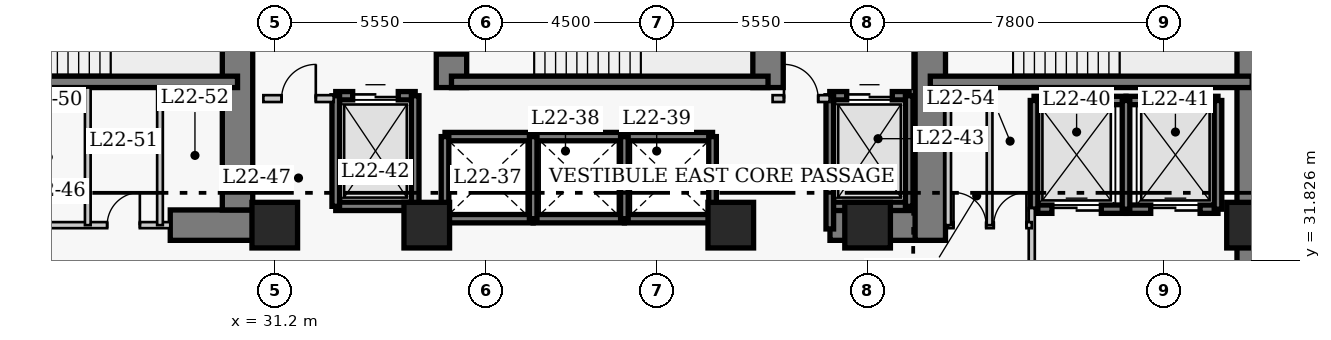
"""IFC4 building model, lengths in metres.
Left out: names, types, materials, properties, quantities, classifications, styles, units other than length and angle.
Written with IfcOpenShell. Run it as: python <this file> out.ifc"""

import sys

from ifc_helpers import new_model, si_unit, direction, frame, frame_2d, origin, origin_2d, place, context, subcontext, project, spatial, rectangle, extrude, element, fill, save


model = new_model("IFC4")
c1 = context("Model", 3, precision=1e-05, world=origin(), true_north=direction((0.0, 1.0)))
c2 = subcontext(c1, "Body", "Model", "MODEL_VIEW")
j1 = project(units=[si_unit("LENGTHUNIT", "METRE"), si_unit("PLANEANGLEUNIT", "RADIAN")], contexts=[c1])
p1 = place(None, origin())
s1 = spatial("IfcSite", under=j1, at=p1, CompositionType="ELEMENT")
p2 = place(p1, origin())
s2 = spatial("IfcBuilding", under=s1, at=p2, CompositionType="ELEMENT")
p3 = place(p2, frame((0.0, 0.0, 91.8)))
s3 = spatial("IfcBuildingStorey", under=s2, at=p3, CompositionType="ELEMENT", Elevation=91.8)
p4 = place(p3, frame((56.92, 27.05, 0.0), z_axis=(0.0, 0.0, 1.0), x_axis=(0.0, 1.0, 0.0)))
e1 = element("IfcWall", 1, at=p4, inside=s3, PredefinedType="SHEAR", context=c2, shape_type="SweptSolid", body=[
    extrude(rectangle(XDim=13.67, YDim=0.8, at=frame_2d((6.835, 0.0))), origin(), (0.0, 0.0, 1.0), 3.8),
])
p5 = place(p3, frame((28.45, 32.75, 0.0), z_axis=(0.0, 0.0, 1.0), x_axis=(1.0, 0.0, 0.0)))
e2 = element("IfcWall", 2, at=p5, inside=s3, PredefinedType="SHEAR", context=c2, shape_type="SweptSolid", body=[
    extrude(rectangle(XDim=2.4, YDim=0.8, at=frame_2d((1.2, 0.0))), origin(), (0.0, 0.0, 1.0), 3.8),
])
p6 = place(p3, frame((45.81, 32.75, 0.0), z_axis=(0.0, 0.0, 1.0), x_axis=(1.0, 0.0, 0.0)))
e3 = element("IfcWall", 3, at=p6, inside=s3, PredefinedType="SHEAR", context=c2, shape_type="SweptSolid", body=[
    extrude(rectangle(XDim=2.64, YDim=0.8, at=frame_2d((1.32, 0.0))), origin(), (0.0, 0.0, 1.0), 3.8),
])
p7 = place(p3, frame((30.22, 33.15, 0.0), z_axis=(0.0, 0.0, 1.0), x_axis=(0.0, 1.0, 0.0)))
e4 = element("IfcWall", 4, at=p7, inside=s3, PredefinedType="SHEAR", context=c2, shape_type="SweptSolid", body=[
    extrude(rectangle(XDim=7.17, YDim=0.8, at=frame_2d((3.585, 0.0))), origin(), (0.0, 0.0, 1.0), 3.8),
])
p8 = place(p3, frame((35.85, 36.37, 0.0), z_axis=(0.0, 0.0, 1.0), x_axis=(0.0, 1.0, 0.0)))
e5 = element("IfcWall", 5, at=p8, inside=s3, PredefinedType="SHEAR", context=c2, shape_type="SweptSolid", body=[
    extrude(rectangle(XDim=3.95, YDim=0.8, at=frame_2d((1.975, 0.0))), origin(), (0.0, 0.0, 1.0), 3.8),
])
p9 = place(p8, frame((0.88, 0.0, 0.0)))
e6 = element("IfcOpeningElement", 6, at=p9, cuts=e5, PredefinedType="OPENING", context=c2, shape_type="SweptSolid", body=[
    extrude(rectangle(XDim=1.1, YDim=2.15, at=frame_2d((0.55, 1.075))), frame((0.0, 0.41, 0.0), z_axis=(0.0, -1.0, 0.0), x_axis=(1.0, 0.0, 0.0)), (0.0, 0.0, 1.0), 0.82),
])
p10 = place(p3, frame((44.18, 36.37, 0.0), z_axis=(0.0, 0.0, 1.0), x_axis=(0.0, 1.0, 0.0)))
e7 = element("IfcWall", 7, at=p10, inside=s3, PredefinedType="SHEAR", context=c2, shape_type="SweptSolid", body=[
    extrude(rectangle(XDim=3.95, YDim=0.8, at=frame_2d((1.975, 0.0))), origin(), (0.0, 0.0, 1.0), 3.8),
])
p11 = place(p3, frame((48.45, 32.35, 0.0), z_axis=(0.0, 0.0, 1.0), x_axis=(0.0, 1.0, 0.0)))
e8 = element("IfcWall", 8, at=p11, inside=s3, PredefinedType="SHEAR", context=c2, shape_type="SweptSolid", body=[
    extrude(rectangle(XDim=7.97, YDim=0.8, at=frame_2d((3.985, 0.0))), origin(), (0.0, 0.0, 1.0), 3.8),
])
p12 = place(p11, frame((5.85, 0.0, 0.0)))
e9 = element("IfcOpeningElement", 9, at=p12, cuts=e8, PredefinedType="OPENING", context=c2, shape_type="SweptSolid", body=[
    extrude(rectangle(XDim=1.1, YDim=2.15, at=frame_2d((0.55, 1.075))), frame((0.0, 0.41, 0.0), z_axis=(0.0, -1.0, 0.0), x_axis=(1.0, 0.0, 0.0)), (0.0, 0.0, 1.0), 0.82),
])
p13 = place(p3, frame((21.9, 36.52, 0.0), z_axis=(0.0, 0.0, 1.0), x_axis=(1.0, 0.0, 0.0)))
e10 = element("IfcWall", 10, at=p13, inside=s3, PredefinedType="SHEAR", context=c2, shape_type="SweptSolid", body=[
    extrude(rectangle(XDim=8.32, YDim=0.3, at=frame_2d((4.16, 0.0))), origin(), (0.0, 0.0, 1.0), 3.8),
])
p14 = place(p13, frame((0.9, 0.0, 0.0)))
e11 = element("IfcOpeningElement", 11, at=p14, cuts=e10, PredefinedType="OPENING", context=c2, shape_type="SweptSolid", body=[
    extrude(rectangle(XDim=1.1, YDim=2.15, at=frame_2d((0.55, 1.075))), frame((0.0, 0.16, 0.0), z_axis=(0.0, -1.0, 0.0), x_axis=(1.0, 0.0, 0.0)), (0.0, 0.0, 1.0), 0.32),
])
p15 = place(p3, frame((35.85, 36.52, 0.0), z_axis=(0.0, 0.0, 1.0), x_axis=(1.0, 0.0, 0.0)))
e12 = element("IfcWall", 12, at=p15, inside=s3, PredefinedType="SHEAR", context=c2, shape_type="SweptSolid", body=[
    extrude(rectangle(XDim=8.33, YDim=0.3, at=frame_2d((4.165, 0.0))), origin(), (0.0, 0.0, 1.0), 3.8),
])
p16 = place(p3, frame((48.45, 36.52, 0.0), z_axis=(0.0, 0.0, 1.0), x_axis=(1.0, 0.0, 0.0)))
e13 = element("IfcWall", 13, at=p16, inside=s3, PredefinedType="SHEAR", context=c2, shape_type="SweptSolid", body=[
    extrude(rectangle(XDim=8.47, YDim=0.3, at=frame_2d((4.235, 0.0))), origin(), (0.0, 0.0, 1.0), 3.8),
])
for number, where, z_axis, x_axis in (
    (14, (31.2, 32.75, 0.0), (0.0, 0.0, 1.0), (1.0, 0.0, 0.0)),
    (15, (35.2, 32.75, 0.0), (0.0, 0.0, 1.0), (1.0, 0.0, 0.0)),
    (16, (43.2, 32.75, 0.0), (0.0, 0.0, 1.0), (1.0, 0.0, 0.0)),
    (17, (46.8, 32.75, 0.0), (0.0, 0.0, 1.0), (1.0, 0.0, 0.0)),
    (18, (56.85, 32.75, 0.0), (0.0, 0.0, 1.0), (1.0, 0.0, 0.0)),
):
    element("IfcColumn", number, at=place(p3, frame(where, z_axis=z_axis, x_axis=x_axis)), inside=s3, PredefinedType="COLUMN", context=c2, shape_type="SweptSolid", body=[
        extrude(rectangle(XDim=1.2, YDim=1.2, at=origin_2d()), origin(), (0.0, 0.0, 1.0), 3.8),
    ])
for number, where, z_axis, x_axis in (
    (19, (35.68, 35.08, 0.0), (0.0, 0.0, 1.0), (1.0, 0.0, 0.0)),
    (20, (35.68, 32.92, 0.0), (0.0, 0.0, 1.0), (1.0, 0.0, 0.0)),
):
    element("IfcWall", number, at=place(p3, frame(where, z_axis=z_axis, x_axis=x_axis)), inside=s3, PredefinedType="SHEAR", context=c2, shape_type="SweptSolid", body=[
        extrude(rectangle(XDim=2.32, YDim=0.22, at=frame_2d((1.16, 0.0))), origin(), (0.0, 0.0, 1.0), 3.8),
    ])
p17 = place(p3, frame((35.68, 32.92, 0.0), z_axis=(0.0, 0.0, 1.0), x_axis=(0.0, 1.0, 0.0)))
e21 = element("IfcWall", 21, at=p17, inside=s3, PredefinedType="SHEAR", context=c2, shape_type="SweptSolid", body=[
    extrude(rectangle(XDim=2.16, YDim=0.2, at=frame_2d((1.08, 0.0))), origin(), (0.0, 0.0, 1.0), 3.8),
])
for number, where, z_axis, x_axis in (
    (22, (38.0, 35.08, 0.0), (0.0, 0.0, 1.0), (1.0, 0.0, 0.0)),
    (23, (38.0, 32.92, 0.0), (0.0, 0.0, 1.0), (1.0, 0.0, 0.0)),
):
    element("IfcWall", number, at=place(p3, frame(where, z_axis=z_axis, x_axis=x_axis)), inside=s3, PredefinedType="SHEAR", context=c2, shape_type="SweptSolid", body=[
        extrude(rectangle(XDim=2.4, YDim=0.22, at=frame_2d((1.2, 0.0))), origin(), (0.0, 0.0, 1.0), 3.8),
    ])
p18 = place(p3, frame((38.0, 32.92, 0.0), z_axis=(0.0, 0.0, 1.0), x_axis=(0.0, 1.0, 0.0)))
e24 = element("IfcWall", 24, at=p18, inside=s3, PredefinedType="SHEAR", context=c2, shape_type="SweptSolid", body=[
    extrude(rectangle(XDim=2.16, YDim=0.2, at=frame_2d((1.08, 0.0))), origin(), (0.0, 0.0, 1.0), 3.8),
])
for number, where, z_axis, x_axis in (
    (25, (40.4, 35.08, 0.0), (0.0, 0.0, 1.0), (1.0, 0.0, 0.0)),
    (26, (40.4, 32.92, 0.0), (0.0, 0.0, 1.0), (1.0, 0.0, 0.0)),
):
    element("IfcWall", number, at=place(p3, frame(where, z_axis=z_axis, x_axis=x_axis)), inside=s3, PredefinedType="SHEAR", context=c2, shape_type="SweptSolid", body=[
        extrude(rectangle(XDim=2.32, YDim=0.22, at=frame_2d((1.16, 0.0))), origin(), (0.0, 0.0, 1.0), 3.8),
    ])
for number, where, z_axis, x_axis in (
    (27, (40.4, 32.92, 0.0), (0.0, 0.0, 1.0), (0.0, 1.0, 0.0)),
    (28, (42.72, 32.92, 0.0), (0.0, 0.0, 1.0), (0.0, 1.0, 0.0)),
):
    element("IfcWall", number, at=place(p3, frame(where, z_axis=z_axis, x_axis=x_axis)), inside=s3, PredefinedType="SHEAR", context=c2, shape_type="SweptSolid", body=[
        extrude(rectangle(XDim=2.16, YDim=0.2, at=frame_2d((1.08, 0.0))), origin(), (0.0, 0.0, 1.0), 3.8),
    ])
p19 = place(p3, frame((51.18, 36.03, 0.0), z_axis=(0.0, 0.0, 1.0), x_axis=(1.0, 0.0, 0.0)))
e29 = element("IfcWall", 29, at=p19, inside=s3, PredefinedType="SHEAR", context=c2, shape_type="SweptSolid", body=[
    extrude(rectangle(XDim=2.42, YDim=0.22, at=frame_2d((1.21, 0.0))), origin(), (0.0, 0.0, 1.0), 3.8),
])
p20 = place(p3, frame((51.18, 33.17, 0.0), z_axis=(0.0, 0.0, 1.0), x_axis=(1.0, 0.0, 0.0)))
e30 = element("IfcWall", 30, at=p20, inside=s3, PredefinedType="SHEAR", context=c2, shape_type="SweptSolid", body=[
    extrude(rectangle(XDim=2.42, YDim=0.22, at=frame_2d((1.21, 0.0))), origin(), (0.0, 0.0, 1.0), 3.8),
])
p21 = place(p20, frame((0.47, 0.0, 0.0)))
e31 = element("IfcOpeningElement", 31, at=p21, cuts=e30, PredefinedType="OPENING", context=c2, shape_type="SweptSolid", body=[
    extrude(rectangle(XDim=1.3, YDim=2.15, at=frame_2d((0.65, 1.075))), frame((0.0, 0.12, 0.0), z_axis=(0.0, -1.0, 0.0), x_axis=(1.0, 0.0, 0.0)), (0.0, 0.0, 1.0), 0.24),
])
p22 = place(p3, frame((51.18, 33.17, 0.0), z_axis=(0.0, 0.0, 1.0), x_axis=(0.0, 1.0, 0.0)))
e32 = element("IfcWall", 32, at=p22, inside=s3, PredefinedType="SHEAR", context=c2, shape_type="SweptSolid", body=[
    extrude(rectangle(XDim=2.86, YDim=0.2, at=frame_2d((1.43, 0.0))), origin(), (0.0, 0.0, 1.0), 3.8),
])
p23 = place(p3, frame((53.6, 36.03, 0.0), z_axis=(0.0, 0.0, 1.0), x_axis=(1.0, 0.0, 0.0)))
e33 = element("IfcWall", 33, at=p23, inside=s3, PredefinedType="SHEAR", context=c2, shape_type="SweptSolid", body=[
    extrude(rectangle(XDim=2.42, YDim=0.22, at=frame_2d((1.21, 0.0))), origin(), (0.0, 0.0, 1.0), 3.8),
])
p24 = place(p3, frame((53.6, 33.17, 0.0), z_axis=(0.0, 0.0, 1.0), x_axis=(1.0, 0.0, 0.0)))
e34 = element("IfcWall", 34, at=p24, inside=s3, PredefinedType="SHEAR", context=c2, shape_type="SweptSolid", body=[
    extrude(rectangle(XDim=2.42, YDim=0.22, at=frame_2d((1.21, 0.0))), origin(), (0.0, 0.0, 1.0), 3.8),
])
p25 = place(p24, frame((0.65, 0.0, 0.0)))
e35 = element("IfcOpeningElement", 35, at=p25, cuts=e34, PredefinedType="OPENING", context=c2, shape_type="SweptSolid", body=[
    extrude(rectangle(XDim=1.3, YDim=2.15, at=frame_2d((0.65, 1.075))), frame((0.0, 0.12, 0.0), z_axis=(0.0, -1.0, 0.0), x_axis=(1.0, 0.0, 0.0)), (0.0, 0.0, 1.0), 0.24),
])
for number, where, z_axis, x_axis in (
    (36, (53.6, 33.17, 0.0), (0.0, 0.0, 1.0), (0.0, 1.0, 0.0)),
    (37, (56.02, 33.17, 0.0), (0.0, 0.0, 1.0), (0.0, 1.0, 0.0)),
):
    element("IfcWall", number, at=place(p3, frame(where, z_axis=z_axis, x_axis=x_axis)), inside=s3, PredefinedType="SHEAR", context=c2, shape_type="SweptSolid", body=[
        extrude(rectangle(XDim=2.86, YDim=0.2, at=frame_2d((1.43, 0.0))), origin(), (0.0, 0.0, 1.0), 3.8),
    ])
p26 = place(p3, frame((32.805, 36.155, 0.0), z_axis=(0.0, 0.0, 1.0), x_axis=(1.0, 0.0, 0.0)))
e38 = element("IfcWall", 38, at=p26, inside=s3, PredefinedType="SHEAR", context=c2, shape_type="SweptSolid", body=[
    extrude(rectangle(XDim=2.09, YDim=0.22, at=frame_2d((1.045, 0.0))), origin(), (0.0, 0.0, 1.0), 3.8),
])
p27 = place(p26, frame((0.445, 0.0, 0.0)))
e39 = element("IfcOpeningElement", 39, at=p27, cuts=e38, PredefinedType="OPENING", context=c2, shape_type="SweptSolid", body=[
    extrude(rectangle(XDim=1.2, YDim=2.15, at=frame_2d((0.6, 1.075))), frame((0.0, 0.12, 0.0), z_axis=(0.0, -1.0, 0.0), x_axis=(1.0, 0.0, 0.0)), (0.0, 0.0, 1.0), 0.24),
])
p28 = place(p3, frame((32.805, 33.245, 0.0), z_axis=(0.0, 0.0, 1.0), x_axis=(1.0, 0.0, 0.0)))
e40 = element("IfcWall", 40, at=p28, inside=s3, PredefinedType="SHEAR", context=c2, shape_type="SweptSolid", body=[
    extrude(rectangle(XDim=2.09, YDim=0.22, at=frame_2d((1.045, 0.0))), origin(), (0.0, 0.0, 1.0), 3.8),
])
for number, where, z_axis, x_axis in (
    (41, (32.805, 33.245, 0.0), (0.0, 0.0, 1.0), (0.0, 1.0, 0.0)),
    (42, (34.895, 33.245, 0.0), (0.0, 0.0, 1.0), (0.0, 1.0, 0.0)),
):
    element("IfcWall", number, at=place(p3, frame(where, z_axis=z_axis, x_axis=x_axis)), inside=s3, PredefinedType="SHEAR", context=c2, shape_type="SweptSolid", body=[
        extrude(rectangle(XDim=2.91, YDim=0.2, at=frame_2d((1.455, 0.0))), origin(), (0.0, 0.0, 1.0), 3.8),
    ])
p29 = place(p3, frame((45.805, 36.155, 0.0), z_axis=(0.0, 0.0, 1.0), x_axis=(1.0, 0.0, 0.0)))
e43 = element("IfcWall", 43, at=p29, inside=s3, PredefinedType="SHEAR", context=c2, shape_type="SweptSolid", body=[
    extrude(rectangle(XDim=2.09, YDim=0.22, at=frame_2d((1.045, 0.0))), origin(), (0.0, 0.0, 1.0), 3.8),
])
p30 = place(p29, frame((0.445, 0.0, 0.0)))
e44 = element("IfcOpeningElement", 44, at=p30, cuts=e43, PredefinedType="OPENING", context=c2, shape_type="SweptSolid", body=[
    extrude(rectangle(XDim=1.2, YDim=2.15, at=frame_2d((0.6, 1.075))), frame((0.0, 0.12, 0.0), z_axis=(0.0, -1.0, 0.0), x_axis=(1.0, 0.0, 0.0)), (0.0, 0.0, 1.0), 0.24),
])
p31 = place(p3, frame((45.805, 33.245, 0.0), z_axis=(0.0, 0.0, 1.0), x_axis=(1.0, 0.0, 0.0)))
e45 = element("IfcWall", 45, at=p31, inside=s3, PredefinedType="SHEAR", context=c2, shape_type="SweptSolid", body=[
    extrude(rectangle(XDim=2.09, YDim=0.22, at=frame_2d((1.045, 0.0))), origin(), (0.0, 0.0, 1.0), 3.8),
])
p32 = place(p3, frame((45.805, 32.65, 0.0), z_axis=(0.0, 0.0, 1.0), x_axis=(0.0, 1.0, 0.0)))
e46 = element("IfcWall", 46, at=p32, inside=s3, PredefinedType="SHEAR", context=c2, shape_type="SweptSolid", body=[
    extrude(rectangle(XDim=3.505, YDim=0.2, at=frame_2d((1.752, 0.0))), origin(), (0.0, 0.0, 1.0), 3.8),
])
p33 = place(p3, frame((47.895, 33.245, 0.0), z_axis=(0.0, 0.0, 1.0), x_axis=(0.0, 1.0, 0.0)))
e47 = element("IfcWall", 47, at=p33, inside=s3, PredefinedType="SHEAR", context=c2, shape_type="SweptSolid", body=[
    extrude(rectangle(XDim=2.91, YDim=0.2, at=frame_2d((1.455, 0.0))), origin(), (0.0, 0.0, 1.0), 3.8),
])
p34 = place(p3, frame((30.9, 36.08, 0.0), z_axis=(0.0, 0.0, 1.0), x_axis=(1.0, 0.0, 0.0)))
e48 = element("IfcWall", 48, at=p34, inside=s3, PredefinedType="PARTITIONING", context=c2, shape_type="SweptSolid", body=[
    extrude(rectangle(XDim=1.85, YDim=0.18, at=frame_2d((0.925, 0.0))), origin(), (0.0, 0.0, 1.0), 3.54),
])
p35 = place(p34, frame((0.48, 0.0, 0.0)))
e49 = element("IfcOpeningElement", 49, at=p35, cuts=e48, PredefinedType="OPENING", context=c2, shape_type="SweptSolid", body=[
    extrude(rectangle(XDim=0.9, YDim=2.15, at=frame_2d((0.45, 1.075))), frame((0.0, 0.1, 0.0), z_axis=(0.0, -1.0, 0.0), x_axis=(1.0, 0.0, 0.0)), (0.0, 0.0, 1.0), 0.2),
])
p36 = place(p3, frame((44.3, 36.08, 0.0), z_axis=(0.0, 0.0, 1.0), x_axis=(1.0, 0.0, 0.0)))
e50 = element("IfcWall", 50, at=p36, inside=s3, PredefinedType="PARTITIONING", context=c2, shape_type="SweptSolid", body=[
    extrude(rectangle(XDim=1.5, YDim=0.18, at=frame_2d((0.75, 0.0))), origin(), (0.0, 0.0, 1.0), 3.54),
])
p37 = place(p36, frame((0.3, 0.0, 0.0)))
e51 = element("IfcOpeningElement", 51, at=p37, cuts=e50, PredefinedType="OPENING", context=c2, shape_type="SweptSolid", body=[
    extrude(rectangle(XDim=0.9, YDim=2.15, at=frame_2d((0.45, 1.075))), frame((0.0, 0.1, 0.0), z_axis=(0.0, -1.0, 0.0), x_axis=(1.0, 0.0, 0.0)), (0.0, 0.0, 1.0), 0.2),
])
p38 = place(p3, frame((51.12, 29.5, 0.0), z_axis=(0.0, 0.0, 1.0), x_axis=(0.0, 1.0, 0.0)))
e52 = element("IfcWall", 52, at=p38, inside=s3, PredefinedType="PARTITIONING", context=c2, shape_type="SweptSolid", body=[
    extrude(rectangle(XDim=3.7, YDim=0.16, at=frame_2d((1.85, 0.0))), origin(), (0.0, 0.0, 1.0), 3.54),
])
p39 = place(p38, frame((0.9, 0.0, 0.0)))
e53 = element("IfcOpeningElement", 53, at=p39, cuts=e52, PredefinedType="OPENING", context=c2, shape_type="SweptSolid", body=[
    extrude(rectangle(XDim=1.1, YDim=2.15, at=frame_2d((0.55, 1.075))), frame((0.0, 0.09, 0.0), z_axis=(0.0, -1.0, 0.0), x_axis=(1.0, 0.0, 0.0)), (0.0, 0.0, 1.0), 0.18),
])
p40 = place(p3, frame((24.48, 32.75, 0.0), z_axis=(0.0, 0.0, 1.0), x_axis=(1.0, 0.0, 0.0)))
e54 = element("IfcWall", 54, at=p40, inside=s3, PredefinedType="PARTITIONING", context=c2, shape_type="SweptSolid", body=[
    extrude(rectangle(XDim=3.97, YDim=0.16, at=frame_2d((1.985, 0.0))), origin(), (0.0, 0.0, 1.0), 3.54),
])
p41 = place(p40, frame((2.31, 0.0, 0.0)))
e55 = element("IfcOpeningElement", 55, at=p41, cuts=e54, PredefinedType="OPENING", context=c2, shape_type="SweptSolid", body=[
    extrude(rectangle(XDim=0.86, YDim=2.05, at=frame_2d((0.43, 1.025))), frame((0.0, 0.09, 0.0), z_axis=(0.0, -1.0, 0.0), x_axis=(1.0, 0.0, 0.0)), (0.0, 0.0, 1.0), 0.18),
])
p42 = place(p3, frame((48.92, 32.75, 0.0), z_axis=(0.0, 0.0, 1.0), x_axis=(1.0, 0.0, 0.0)))
e56 = element("IfcWall", 56, at=p42, inside=s3, PredefinedType="PARTITIONING", context=c2, shape_type="SweptSolid", body=[
    extrude(rectangle(XDim=2.2, YDim=0.16, at=frame_2d((1.1, 0.0))), origin(), (0.0, 0.0, 1.0), 3.54),
])
p43 = place(p42, frame((0.14, 0.0, 0.0)))
e57 = element("IfcOpeningElement", 57, at=p43, cuts=e56, PredefinedType="OPENING", context=c2, shape_type="SweptSolid", body=[
    extrude(rectangle(XDim=0.86, YDim=2.05, at=frame_2d((0.43, 1.025))), frame((0.0, 0.09, 0.0), z_axis=(0.0, -1.0, 0.0), x_axis=(1.0, 0.0, 0.0)), (0.0, 0.0, 1.0), 0.18),
])
p44 = place(p42, frame((1.2, 0.0, 0.0)))
e58 = element("IfcOpeningElement", 58, at=p44, cuts=e56, PredefinedType="OPENING", context=c2, shape_type="SweptSolid", body=[
    extrude(rectangle(XDim=0.86, YDim=2.05, at=frame_2d((0.43, 1.025))), frame((0.0, 0.09, 0.0), z_axis=(0.0, -1.0, 0.0), x_axis=(1.0, 0.0, 0.0)), (0.0, 0.0, 1.0), 0.18),
])
for number, where, z_axis, x_axis in (
    (59, (48.92, 32.75, 0.0), (0.0, 0.0, 1.0), (0.0, 1.0, 0.0)),
    (60, (26.28, 32.75, 0.0), (0.0, 0.0, 1.0), (0.0, 1.0, 0.0)),
    (61, (28.18, 32.75, 0.0), (0.0, 0.0, 1.0), (0.0, 1.0, 0.0)),
    (62, (50.01, 32.75, 0.0), (0.0, 0.0, 1.0), (0.0, 1.0, 0.0)),
):
    element("IfcWall", number, at=place(p3, frame(where, z_axis=z_axis, x_axis=x_axis)), inside=s3, PredefinedType="PARTITIONING", context=c2, shape_type="SweptSolid", body=[
        extrude(rectangle(XDim=3.62, YDim=0.15, at=frame_2d((1.81, 0.0))), origin(), (0.0, 0.0, 1.0), 3.54),
    ])
p45 = place(p21, origin())
e63 = element("IfcDoor", 63, at=p45, inside=s3, OperationType="DOUBLE_DOOR_SLIDING", PredefinedType="DOOR", context=c2, shape_type="SweptSolid", body=[
    extrude(rectangle(XDim=1.3, YDim=2.15, at=frame_2d((0.65, 1.075))), frame((0.0, 0.025, 0.0), z_axis=(0.0, -1.0, 0.0), x_axis=(1.0, 0.0, 0.0)), (0.0, 0.0, 1.0), 0.05),
])
fill(e31, e63)
p46 = place(p25, origin())
e64 = element("IfcDoor", 64, at=p46, inside=s3, OperationType="DOUBLE_DOOR_SLIDING", PredefinedType="DOOR", context=c2, shape_type="SweptSolid", body=[
    extrude(rectangle(XDim=1.3, YDim=2.15, at=frame_2d((0.65, 1.075))), frame((0.0, 0.025, 0.0), z_axis=(0.0, -1.0, 0.0), x_axis=(1.0, 0.0, 0.0)), (0.0, 0.0, 1.0), 0.05),
])
fill(e35, e64)
p47 = place(p27, origin())
e65 = element("IfcDoor", 65, at=p47, inside=s3, OperationType="DOUBLE_DOOR_SLIDING", PredefinedType="DOOR", context=c2, shape_type="SweptSolid", body=[
    extrude(rectangle(XDim=1.2, YDim=2.15, at=frame_2d((0.6, 1.075))), frame((0.0, 0.025, 0.0), z_axis=(0.0, -1.0, 0.0), x_axis=(1.0, 0.0, 0.0)), (0.0, 0.0, 1.0), 0.05),
])
fill(e39, e65)
p48 = place(p30, origin())
e66 = element("IfcDoor", 66, at=p48, inside=s3, OperationType="DOUBLE_DOOR_SLIDING", PredefinedType="DOOR", context=c2, shape_type="SweptSolid", body=[
    extrude(rectangle(XDim=1.2, YDim=2.15, at=frame_2d((0.6, 1.075))), frame((0.0, 0.025, 0.0), z_axis=(0.0, -1.0, 0.0), x_axis=(1.0, 0.0, 0.0)), (0.0, 0.0, 1.0), 0.05),
])
fill(e44, e66)
p49 = place(p35, origin())
e67 = element("IfcDoor", 67, at=p49, inside=s3, OperationType="SINGLE_SWING_RIGHT", PredefinedType="DOOR", context=c2, shape_type="SweptSolid", body=[
    extrude(rectangle(XDim=0.9, YDim=2.15, at=frame_2d((0.45, 1.075))), frame((0.0, 0.025, 0.0), z_axis=(0.0, -1.0, 0.0), x_axis=(1.0, 0.0, 0.0)), (0.0, 0.0, 1.0), 0.05),
])
fill(e49, e67)
p50 = place(p37, origin())
e68 = element("IfcDoor", 68, at=p50, inside=s3, OperationType="SINGLE_SWING_LEFT", PredefinedType="DOOR", context=c2, shape_type="SweptSolid", body=[
    extrude(rectangle(XDim=0.9, YDim=2.15, at=frame_2d((0.45, 1.075))), frame((0.0, 0.025, 0.0), z_axis=(0.0, -1.0, 0.0), x_axis=(1.0, 0.0, 0.0)), (0.0, 0.0, 1.0), 0.05),
])
fill(e51, e68)
p51 = place(p41, origin())
e69 = element("IfcDoor", 69, at=p51, inside=s3, OperationType="SINGLE_SWING_RIGHT", PredefinedType="DOOR", context=c2, shape_type="SweptSolid", body=[
    extrude(rectangle(XDim=0.86, YDim=2.05, at=frame_2d((0.43, 1.025))), frame((0.0, 0.025, 0.0), z_axis=(0.0, -1.0, 0.0), x_axis=(1.0, 0.0, 0.0)), (0.0, 0.0, 1.0), 0.05),
])
fill(e55, e69)
p52 = place(p43, origin())
e70 = element("IfcDoor", 70, at=p52, inside=s3, OperationType="SINGLE_SWING_LEFT", PredefinedType="DOOR", context=c2, shape_type="SweptSolid", body=[
    extrude(rectangle(XDim=0.86, YDim=2.05, at=frame_2d((0.43, 1.025))), frame((0.0, 0.025, 0.0), z_axis=(0.0, -1.0, 0.0), x_axis=(1.0, 0.0, 0.0)), (0.0, 0.0, 1.0), 0.05),
])
fill(e57, e70)
p53 = place(p44, origin())
e71 = element("IfcDoor", 71, at=p53, inside=s3, OperationType="SINGLE_SWING_RIGHT", PredefinedType="DOOR", context=c2, shape_type="SweptSolid", body=[
    extrude(rectangle(XDim=0.86, YDim=2.05, at=frame_2d((0.43, 1.025))), frame((0.0, 0.025, 0.0), z_axis=(0.0, -1.0, 0.0), x_axis=(1.0, 0.0, 0.0)), (0.0, 0.0, 1.0), 0.05),
])
fill(e58, e71)
p54 = place(p9, origin())
e72 = element("IfcDoor", 72, at=p54, inside=s3, OperationType="SINGLE_SWING_RIGHT", PredefinedType="DOOR", context=c2, shape_type="SweptSolid", body=[
    extrude(rectangle(XDim=1.1, YDim=2.15, at=frame_2d((0.55, 1.075))), frame((0.0, 0.025, 0.0), z_axis=(0.0, -1.0, 0.0), x_axis=(1.0, 0.0, 0.0)), (0.0, 0.0, 1.0), 0.05),
])
fill(e6, e72)
save(model, sys.argv[1])
